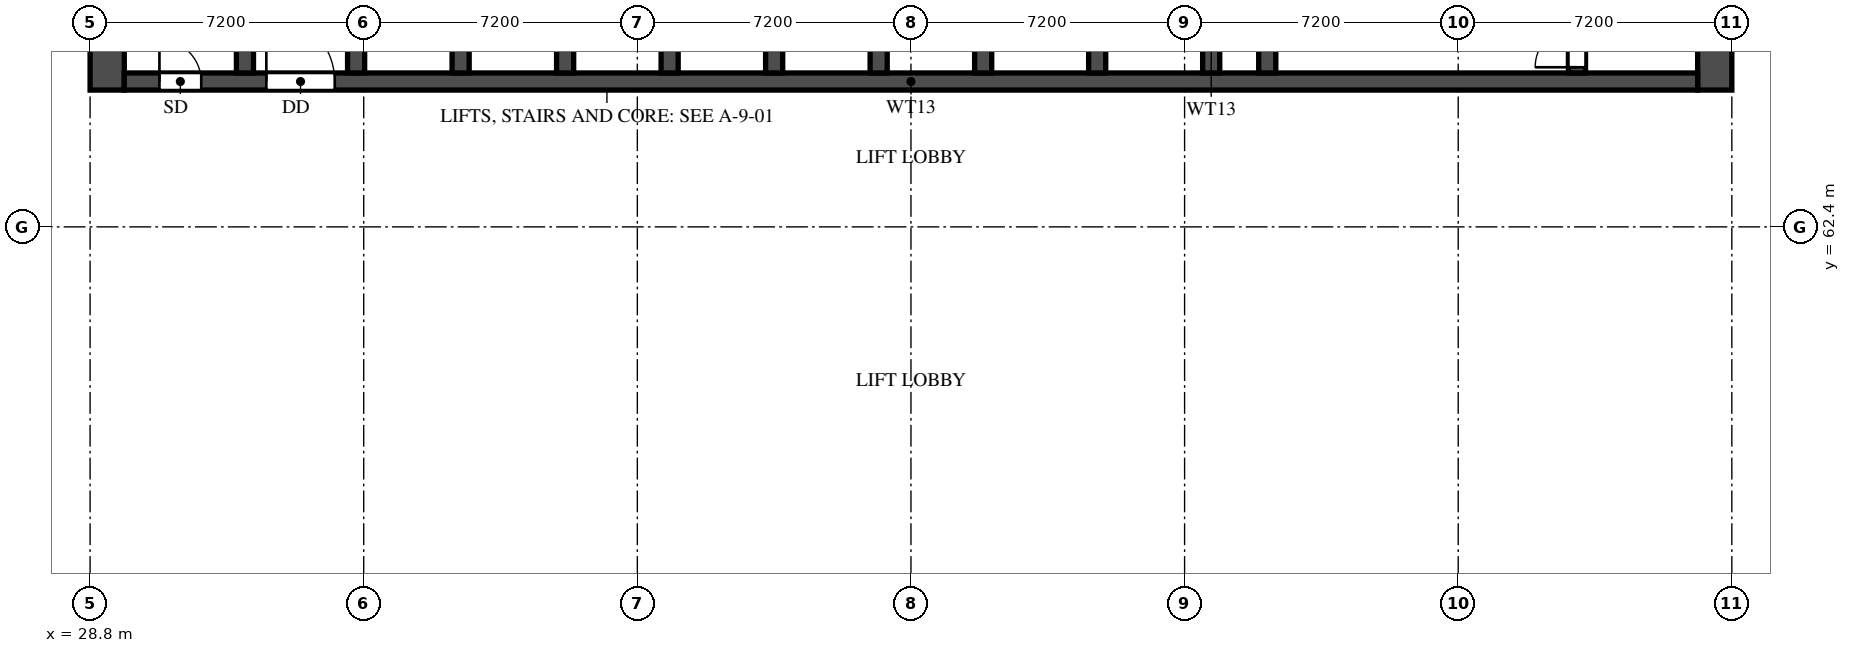
"""IFC4 building model, lengths in metres.
Left out: names, types, materials, properties, quantities, classifications, styles, units other than length and angle.
Written with IfcOpenShell. Run it as: python <this file> out.ifc"""

import sys

from ifc_helpers import new_model, si_unit, direction, frame, frame_2d, origin, place, context, subcontext, project, spatial, rectangle, extrude, element, fill, save


model = new_model("IFC4")
c1 = context("Model", 3, precision=1e-05, world=origin(), true_north=direction((0.0, 1.0)))
c2 = subcontext(c1, "Body", "Model", "MODEL_VIEW")
j1 = project(units=[si_unit("LENGTHUNIT", "METRE"), si_unit("PLANEANGLEUNIT", "RADIAN")], contexts=[c1])
p1 = place(None, origin())
s1 = spatial("IfcSite", under=j1, at=p1, CompositionType="ELEMENT")
p2 = place(p1, origin())
s2 = spatial("IfcBuilding", under=s1, at=p2, CompositionType="ELEMENT")
p3 = place(p2, frame((0.0, 0.0, -5.4)))
s3 = spatial("IfcBuildingStorey", under=s2, at=p3, CompositionType="ELEMENT", Elevation=-5.4)
for number, where, z_axis, x_axis in (
    (1, (29.25, 66.0, 0.0), (0.0, 0.0, 1.0), (0.0, 1.0, 0.0)),
    (2, (71.55, 66.0, 0.0), (0.0, 0.0, 1.0), (0.0, 1.0, 0.0)),
):
    element("IfcWall", number, at=place(p3, frame(where, z_axis=z_axis, x_axis=x_axis)), inside=s3, PredefinedType="SHEAR", context=c2, shape_type="SweptSolid", body=[
        extrude(rectangle(XDim=12.0, YDim=0.9, at=frame_2d((6.0, 0.0))), origin(), (0.0, 0.0, 1.0), 5.0),
    ])
p4 = place(p3, frame((29.7, 66.225, 0.0), z_axis=(0.0, 0.0, 1.0), x_axis=(1.0, 0.0, 0.0)))
e3 = element("IfcWall", 3, at=p4, inside=s3, PredefinedType="SHEAR", context=c2, shape_type="SweptSolid", body=[
    extrude(rectangle(XDim=41.4, YDim=0.45, at=frame_2d((20.7, 0.0))), origin(), (0.0, 0.0, 1.0), 5.0),
])
p5 = place(p4, frame((0.925, 0.0, 0.0)))
e4 = element("IfcOpeningElement", 4, at=p5, cuts=e3, PredefinedType="OPENING", context=c2, shape_type="SweptSolid", body=[
    extrude(rectangle(XDim=1.1, YDim=2.1, at=frame_2d((0.55, 1.05))), frame((0.0, 0.235, 0.0), z_axis=(0.0, -1.0, 0.0), x_axis=(1.0, 0.0, 0.0)), (0.0, 0.0, 1.0), 0.47),
])
p6 = place(p4, frame((3.738, 0.0, 0.0)))
e5 = element("IfcOpeningElement", 5, at=p6, cuts=e3, PredefinedType="OPENING", context=c2, shape_type="SweptSolid", body=[
    extrude(rectangle(XDim=1.8, YDim=2.1, at=frame_2d((0.9, 1.05))), frame((0.0, 0.235, 0.0), z_axis=(0.0, -1.0, 0.0), x_axis=(1.0, 0.0, 0.0)), (0.0, 0.0, 1.0), 0.47),
])
p7 = place(p3, frame((32.875, 66.45, 0.0), z_axis=(0.0, 0.0, 1.0), x_axis=(0.0, 1.0, 0.0)))
e6 = element("IfcWall", 6, at=p7, inside=s3, PredefinedType="SHEAR", context=c2, shape_type="SweptSolid", body=[
    extrude(rectangle(XDim=10.65, YDim=0.45, at=frame_2d((5.325, 0.0))), origin(), (0.0, 0.0, 1.0), 5.0),
])
p8 = place(p3, frame((67.925, 66.45, 0.0), z_axis=(0.0, 0.0, 1.0), x_axis=(0.0, 1.0, 0.0)))
e7 = element("IfcWall", 7, at=p8, inside=s3, PredefinedType="SHEAR", context=c2, shape_type="SweptSolid", body=[
    extrude(rectangle(XDim=10.65, YDim=0.45, at=frame_2d((5.325, 0.0))), origin(), (0.0, 0.0, 1.0), 5.0),
])
p9 = place(p8, frame((0.15, 0.0, 0.0)))
e8 = element("IfcOpeningElement", 8, at=p9, cuts=e7, PredefinedType="OPENING", context=c2, shape_type="SweptSolid", body=[
    extrude(rectangle(XDim=1.1, YDim=2.1, at=frame_2d((0.55, 1.05))), frame((0.0, 0.235, 0.0), z_axis=(0.0, -1.0, 0.0), x_axis=(1.0, 0.0, 0.0)), (0.0, 0.0, 1.0), 0.47),
])
p10 = place(p3, frame((59.775, 66.45, 0.0), z_axis=(0.0, 0.0, 1.0), x_axis=(0.0, 1.0, 0.0)))
e9 = element("IfcWall", 9, at=p10, inside=s3, PredefinedType="SHEAR", context=c2, shape_type="SweptSolid", body=[
    extrude(rectangle(XDim=6.025, YDim=0.45, at=frame_2d((3.013, 0.0))), origin(), (0.0, 0.0, 1.0), 5.0),
])
p11 = place(p10, frame((3.85, 0.0, 0.0)))
e10 = element("IfcOpeningElement", 10, at=p11, cuts=e9, PredefinedType="OPENING", context=c2, shape_type="SweptSolid", body=[
    extrude(rectangle(XDim=1.2, YDim=2.1, at=frame_2d((0.6, 1.05))), frame((0.0, 0.235, 0.0), z_axis=(0.0, -1.0, 0.0), x_axis=(1.0, 0.0, 0.0)), (0.0, 0.0, 1.0), 0.47),
])
for number, where, z_axis, x_axis in (
    (11, (35.8, 66.45, 0.0), (0.0, 0.0, 1.0), (0.0, 1.0, 0.0)),
    (12, (38.55, 66.45, 0.0), (0.0, 0.0, 1.0), (0.0, 1.0, 0.0)),
    (13, (41.3, 66.45, 0.0), (0.0, 0.0, 1.0), (0.0, 1.0, 0.0)),
    (14, (44.05, 66.45, 0.0), (0.0, 0.0, 1.0), (0.0, 1.0, 0.0)),
    (15, (46.8, 66.45, 0.0), (0.0, 0.0, 1.0), (0.0, 1.0, 0.0)),
    (16, (49.55, 66.45, 0.0), (0.0, 0.0, 1.0), (0.0, 1.0, 0.0)),
    (17, (52.3, 66.45, 0.0), (0.0, 0.0, 1.0), (0.0, 1.0, 0.0)),
    (18, (55.3, 66.45, 0.0), (0.0, 0.0, 1.0), (0.0, 1.0, 0.0)),
    (19, (58.3, 66.45, 0.0), (0.0, 0.0, 1.0), (0.0, 1.0, 0.0)),
):
    element("IfcWall", number, at=place(p3, frame(where, z_axis=z_axis, x_axis=x_axis)), inside=s3, PredefinedType="SHEAR", context=c2, shape_type="SweptSolid", body=[
        extrude(rectangle(XDim=2.425, YDim=0.45, at=frame_2d((1.212, 0.0))), origin(), (0.0, 0.0, 1.0), 5.0),
    ])
p12 = place(p5, origin())
e20 = element("IfcDoor", 20, at=p12, inside=s3, OperationType="SINGLE_SWING_LEFT", PredefinedType="DOOR", context=c2, shape_type="SweptSolid", body=[
    extrude(rectangle(XDim=1.1, YDim=2.1, at=frame_2d((0.55, 1.05))), frame((0.0, 0.025, 0.0), z_axis=(0.0, -1.0, 0.0), x_axis=(1.0, 0.0, 0.0)), (0.0, 0.0, 1.0), 0.05),
])
fill(e4, e20)
p13 = place(p9, origin())
e21 = element("IfcDoor", 21, at=p13, inside=s3, OperationType="SINGLE_SWING_LEFT", PredefinedType="DOOR", context=c2, shape_type="SweptSolid", body=[
    extrude(rectangle(XDim=1.1, YDim=2.1, at=frame_2d((0.55, 1.05))), frame((0.0, 0.025, 0.0), z_axis=(0.0, -1.0, 0.0), x_axis=(1.0, 0.0, 0.0)), (0.0, 0.0, 1.0), 0.05),
])
fill(e8, e21)
p14 = place(p6, origin())
e22 = element("IfcDoor", 22, at=p14, inside=s3, OperationType="DOUBLE_DOOR_SINGLE_SWING", PredefinedType="DOOR", context=c2, shape_type="SweptSolid", body=[
    extrude(rectangle(XDim=1.8, YDim=2.1, at=frame_2d((0.9, 1.05))), frame((0.0, 0.025, 0.0), z_axis=(0.0, -1.0, 0.0), x_axis=(1.0, 0.0, 0.0)), (0.0, 0.0, 1.0), 0.05),
])
fill(e5, e22)
save(model, sys.argv[1])
